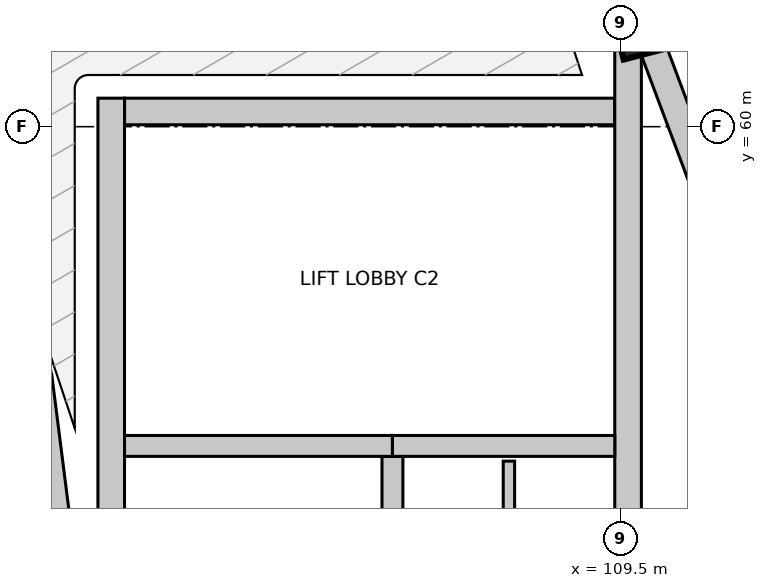
"""IFC4 building model, lengths in metres.
Left out: names, types, materials, properties, quantities, classifications, styles, units other than length and angle.
Written with IfcOpenShell. Run it as: python <this file> out.ifc"""

import sys

from ifc_helpers import new_model, si_unit, direction, frame, frame_2d, origin, origin_2d, place, context, subcontext, project, spatial, rectangle, extrude, element, fill, save


model = new_model("IFC4")
c1 = context("Model", 3, precision=1e-05, world=origin(), true_north=direction((0.0, 1.0)))
c2 = subcontext(c1, "Body", "Model", "MODEL_VIEW")
j1 = project(units=[si_unit("LENGTHUNIT", "METRE"), si_unit("PLANEANGLEUNIT", "RADIAN")], contexts=[c1])
p1 = place(None, origin())
s1 = spatial("IfcSite", under=j1, at=p1, CompositionType="ELEMENT")
p2 = place(p1, origin())
s2 = spatial("IfcBuilding", under=s1, at=p2, CompositionType="ELEMENT")
p3 = place(p2, frame((0.0, 0.0, 9.6)))
s3 = spatial("IfcBuildingStorey", under=s2, at=p3, CompositionType="ELEMENT", Elevation=9.6)
p4 = place(p3, frame((109.811, 61.34, 0.0), z_axis=(0.0, 0.0, 1.0), x_axis=(0.967841021032, 0.251562632376, 0.0)))
e1 = element("IfcColumn", 1, at=p4, inside=s3, PredefinedType="COLUMN", context=c2, shape_type="SweptSolid", body=[
    extrude(rectangle(XDim=0.75, YDim=0.75, at=origin_2d()), origin(), (0.0, 0.0, 1.0), 4.8),
])
p5 = place(p3, frame((111.075, 57.973, 0.0), z_axis=(0.0, 0.0, 1.0), x_axis=(-0.351279653979, 0.936270583058, 0.0)))
e2 = element("IfcWall", 2, at=p5, inside=s3, PredefinedType="SHEAR", context=c2, shape_type="SweptSolid", body=[
    extrude(rectangle(XDim=3.597, YDim=0.35, at=frame_2d((1.798, 0.0))), origin(), (0.0, 0.0, 1.0), 4.55),
])
p6 = place(p3, frame((102.1, 54.5, 0.0), z_axis=(0.0, 0.0, 1.0), x_axis=(-0.126180195213, 0.992007337844, 0.0)))
e3 = element("IfcWall", 3, at=p6, inside=s3, PredefinedType="SOLIDWALL", context=c2, shape_type="SweptSolid", body=[
    extrude(rectangle(XDim=2.24, YDim=0.4, at=frame_2d((1.12, 0.0))), origin(), (0.0, 0.0, 1.0), 4.55),
])
p7 = place(p3, frame((102.975, 60.2, 0.0), z_axis=(0.0, 0.0, 1.0), x_axis=(1.0, 0.0, 0.0)))
e4 = element("IfcWall", 4, at=p7, inside=s3, PredefinedType="SHEAR", context=c2, shape_type="SweptSolid", body=[
    extrude(rectangle(XDim=6.45, YDim=0.35, at=frame_2d((3.225, 0.0))), origin(), (0.0, 0.0, 1.0), 4.55),
])
p8 = place(p7, frame((2.5, 0.0, 0.0)))
e5 = element("IfcOpeningElement", 5, at=p8, cuts=e4, PredefinedType="OPENING", context=c2, shape_type="SweptSolid", body=[
    extrude(rectangle(XDim=1.45, YDim=2.2, at=frame_2d((0.725, 1.1))), frame((0.0, 0.185, 0.0), z_axis=(0.0, -1.0, 0.0), x_axis=(1.0, 0.0, 0.0)), (0.0, 0.0, 1.0), 0.37),
])
p9 = place(p3, frame((102.8, 48.775, 0.0), z_axis=(0.0, 0.0, 1.0), x_axis=(0.0, 1.0, 0.0)))
e6 = element("IfcWall", 6, at=p9, inside=s3, PredefinedType="SHEAR", context=c2, shape_type="SweptSolid", body=[
    extrude(rectangle(XDim=11.6, YDim=0.35, at=frame_2d((5.8, 0.0))), origin(), (0.0, 0.0, 1.0), 4.55),
])
p10 = place(p3, frame((109.6, 48.775, 0.0), z_axis=(0.0, 0.0, 1.0), x_axis=(0.0, 1.0, 0.0)))
e7 = element("IfcWall", 7, at=p10, inside=s3, PredefinedType="SHEAR", context=c2, shape_type="SweptSolid", body=[
    extrude(rectangle(XDim=12.565, YDim=0.35, at=frame_2d((6.283, 0.0))), origin(), (0.0, 0.0, 1.0), 4.55),
])
p11 = place(p3, frame((106.5, 48.775, 0.0), z_axis=(0.0, 0.0, 1.0), x_axis=(0.0, 1.0, 0.0)))
e8 = element("IfcWall", 8, at=p11, inside=s3, PredefinedType="SHEAR", context=c2, shape_type="SweptSolid", body=[
    extrude(rectangle(XDim=6.888, YDim=0.275, at=frame_2d((3.444, 0.0))), origin(), (0.0, 0.0, 1.0), 4.55),
])
p12 = place(p3, frame((102.975, 55.8, 0.0), z_axis=(0.0, 0.0, 1.0), x_axis=(1.0, 0.0, 0.0)))
e9 = element("IfcWall", 9, at=p12, inside=s3, PredefinedType="SHEAR", context=c2, shape_type="SweptSolid", body=[
    extrude(rectangle(XDim=3.525, YDim=0.275, at=frame_2d((1.762, 0.0))), origin(), (0.0, 0.0, 1.0), 4.55),
])
p13 = place(p12, frame((1.785, 0.0, 0.0)))
e10 = element("IfcOpeningElement", 10, at=p13, cuts=e9, PredefinedType="OPENING", context=c2, shape_type="SweptSolid", body=[
    extrude(rectangle(XDim=1.25, YDim=2.15, at=frame_2d((0.625, 1.075))), frame((0.0, 0.147, 0.0), z_axis=(0.0, -1.0, 0.0), x_axis=(1.0, 0.0, 0.0)), (0.0, 0.0, 1.0), 0.295),
])
p14 = place(p3, frame((106.5, 55.8, 0.0), z_axis=(0.0, 0.0, 1.0), x_axis=(1.0, 0.0, 0.0)))
e11 = element("IfcWall", 11, at=p14, inside=s3, PredefinedType="SHEAR", context=c2, shape_type="SweptSolid", body=[
    extrude(rectangle(XDim=2.925, YDim=0.275, at=frame_2d((1.462, 0.0))), origin(), (0.0, 0.0, 1.0), 4.55),
])
p15 = place(p14, frame((0.32, 0.0, 0.0)))
e12 = element("IfcOpeningElement", 12, at=p15, cuts=e11, PredefinedType="OPENING", context=c2, shape_type="SweptSolid", body=[
    extrude(rectangle(XDim=1.1, YDim=2.15, at=frame_2d((0.55, 1.075))), frame((0.0, 0.147, 0.0), z_axis=(0.0, -1.0, 0.0), x_axis=(1.0, 0.0, 0.0)), (0.0, 0.0, 1.0), 0.295),
])
p16 = place(p14, frame((1.645, 0.0, 0.0)))
e13 = element("IfcOpeningElement", 13, at=p16, cuts=e11, PredefinedType="OPENING", context=c2, shape_type="SweptSolid", body=[
    extrude(rectangle(XDim=1.1, YDim=2.15, at=frame_2d((0.55, 1.075))), frame((0.0, 0.147, 0.0), z_axis=(0.0, -1.0, 0.0), x_axis=(1.0, 0.0, 0.0)), (0.0, 0.0, 1.0), 0.295),
])
p17 = place(p3, frame((108.032, 48.775, 0.0), z_axis=(0.0, 0.0, 1.0), x_axis=(0.0, 1.0, 0.0)))
e14 = element("IfcWall", 14, at=p17, inside=s3, PredefinedType="PARTITIONING", context=c2, shape_type="SweptSolid", body=[
    extrude(rectangle(XDim=6.825, YDim=0.15, at=frame_2d((3.413, 0.0))), origin(), (0.0, 0.0, 1.0), 4.544),
])
p18 = place(p13, origin())
e15 = element("IfcDoor", 15, at=p18, inside=s3, OperationType="SINGLE_SWING_RIGHT", PredefinedType="DOOR", context=c2, shape_type="SweptSolid", body=[
    extrude(rectangle(XDim=1.25, YDim=2.15, at=frame_2d((0.625, 1.075))), frame((0.0, 0.025, 0.0), z_axis=(0.0, -1.0, 0.0), x_axis=(1.0, 0.0, 0.0)), (0.0, 0.0, 1.0), 0.05),
])
fill(e10, e15)
p19 = place(p15, origin())
e16 = element("IfcDoor", 16, at=p19, inside=s3, OperationType="DOUBLE_DOOR_SLIDING", PredefinedType="DOOR", context=c2, shape_type="SweptSolid", body=[
    extrude(rectangle(XDim=1.1, YDim=2.15, at=frame_2d((0.55, 1.075))), frame((0.0, 0.025, 0.0), z_axis=(0.0, -1.0, 0.0), x_axis=(1.0, 0.0, 0.0)), (0.0, 0.0, 1.0), 0.05),
])
fill(e12, e16)
p20 = place(p16, origin())
e17 = element("IfcDoor", 17, at=p20, inside=s3, OperationType="DOUBLE_DOOR_SLIDING", PredefinedType="DOOR", context=c2, shape_type="SweptSolid", body=[
    extrude(rectangle(XDim=1.1, YDim=2.15, at=frame_2d((0.55, 1.075))), frame((0.0, 0.025, 0.0), z_axis=(0.0, -1.0, 0.0), x_axis=(1.0, 0.0, 0.0)), (0.0, 0.0, 1.0), 0.05),
])
fill(e13, e17)
p21 = place(p8, origin())
e18 = element("IfcDoor", 18, at=p21, inside=s3, OperationType="SINGLE_SWING_LEFT", PredefinedType="DOOR", context=c2, shape_type="SweptSolid", body=[
    extrude(rectangle(XDim=1.45, YDim=2.2, at=frame_2d((0.725, 1.1))), frame((0.0, 0.025, 0.0), z_axis=(0.0, -1.0, 0.0), x_axis=(1.0, 0.0, 0.0)), (0.0, 0.0, 1.0), 0.05),
])
fill(e5, e18)
save(model, sys.argv[1])
